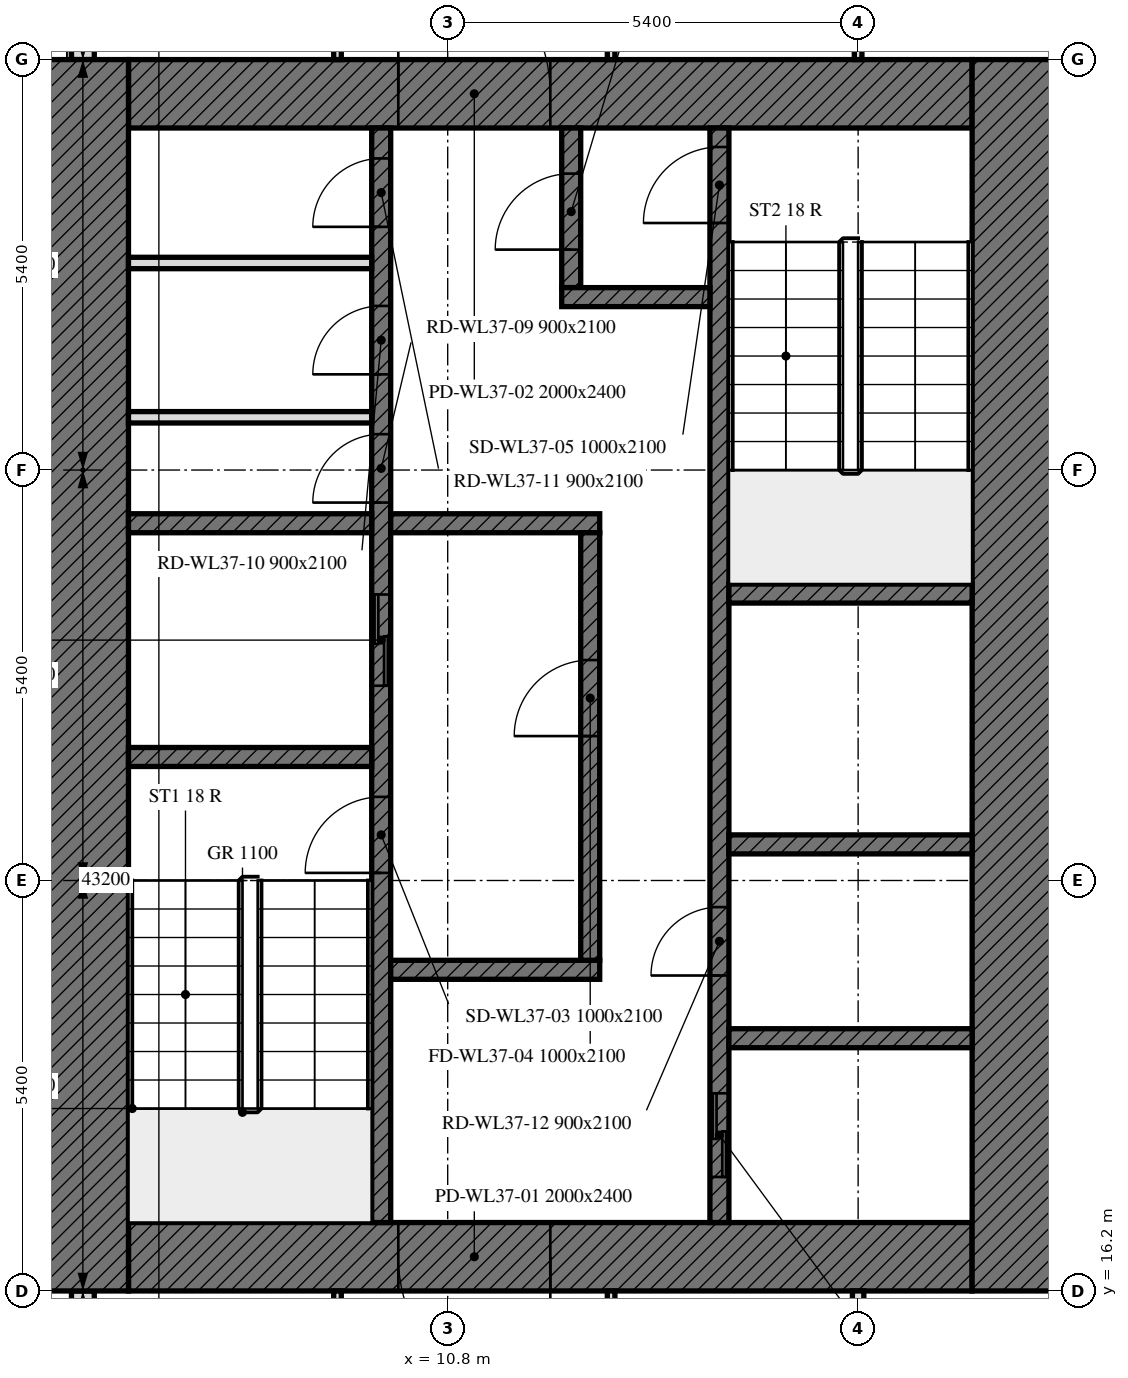
"""IFC4 building model, lengths in metres.
Left out: names, types, materials, properties, quantities, classifications, styles, units other than length and angle.
Written with IfcOpenShell. Run it as: python <this file> out.ifc"""

import sys

from ifc_helpers import new_model, si_unit, direction, frame, frame_2d, origin, place, context, subcontext, project, spatial, rectangle, extrude, element, fill, save


model = new_model("IFC4")
c1 = context("Model", 3, precision=1e-05, world=origin(), true_north=direction((0.0, 1.0)))
c2 = subcontext(c1, "Body", "Model", "MODEL_VIEW")
j1 = project(units=[si_unit("LENGTHUNIT", "METRE"), si_unit("PLANEANGLEUNIT", "RADIAN")], contexts=[c1])
p1 = place(None, origin())
s1 = spatial("IfcSite", under=j1, at=p1, CompositionType="ELEMENT")
p2 = place(p1, origin())
s2 = spatial("IfcBuilding", under=s1, at=p2, CompositionType="ELEMENT")
p3 = place(p2, frame((0.0, 0.0, 159.4)))
s3 = spatial("IfcBuildingStorey", under=s2, at=p3, CompositionType="ELEMENT", Elevation=159.4)
p4 = place(p3, frame((6.0, 37.614, 0.0), z_axis=(0.0, 0.0, 1.0), x_axis=(0.0, -1.0, 0.0)))
e1 = element("IfcWall", 1, at=p4, inside=s3, PredefinedType="SOLIDWALL", context=c2, shape_type="SweptSolid", body=[
    extrude(rectangle(XDim=5.214, YDim=0.3, at=frame_2d((2.607, 0.0))), origin(), (0.0, 0.0, 1.0), 3.0),
])
p5 = place(p4, frame((1.164, 0.0, 0.9)))
e2 = element("IfcOpeningElement", 2, at=p5, cuts=e1, PredefinedType="OPENING", context=c2, shape_type="SweptSolid", body=[
    extrude(rectangle(XDim=1.1, YDim=1.7, at=frame_2d((0.55, 0.85))), frame((0.0, 0.16, 0.0), z_axis=(0.0, -1.0, 0.0), x_axis=(1.0, 0.0, 0.0)), (0.0, 0.0, 1.0), 0.32),
])
p6 = place(p4, frame((2.764, 0.0, 0.9)))
e3 = element("IfcOpeningElement", 3, at=p6, cuts=e1, PredefinedType="OPENING", context=c2, shape_type="SweptSolid", body=[
    extrude(rectangle(XDim=1.1, YDim=1.7, at=frame_2d((0.55, 0.85))), frame((0.0, 0.16, 0.0), z_axis=(0.0, -1.0, 0.0), x_axis=(1.0, 0.0, 0.0)), (0.0, 0.0, 1.0), 0.32),
])
p7 = place(p3, frame((6.0, 16.2, 0.0), z_axis=(0.0, 0.0, 1.0), x_axis=(0.0, -1.0, 0.0)))
e4 = element("IfcWall", 4, at=p7, inside=s3, PredefinedType="SOLIDWALL", context=c2, shape_type="SweptSolid", body=[
    extrude(rectangle(XDim=10.614, YDim=0.3, at=frame_2d((5.307, 0.0))), origin(), (0.0, 0.0, 1.0), 3.0),
])
p8 = place(p7, frame((1.0, 0.0, 0.9)))
e5 = element("IfcOpeningElement", 5, at=p8, cuts=e4, PredefinedType="OPENING", context=c2, shape_type="SweptSolid", body=[
    extrude(rectangle(XDim=3.4, YDim=1.7, at=frame_2d((1.7, 0.85))), frame((0.0, 0.16, 0.0), z_axis=(0.0, -1.0, 0.0), x_axis=(1.0, 0.0, 0.0)), (0.0, 0.0, 1.0), 0.32),
])
p9 = place(p7, frame((7.375, 0.0, 0.9)))
e6 = element("IfcOpeningElement", 6, at=p9, cuts=e4, PredefinedType="OPENING", context=c2, shape_type="SweptSolid", body=[
    extrude(rectangle(XDim=0.65, YDim=1.7, at=frame_2d((0.325, 0.85))), frame((0.0, 0.16, 0.0), z_axis=(0.0, -1.0, 0.0), x_axis=(1.0, 0.0, 0.0)), (0.0, 0.0, 1.0), 0.32),
])
p10 = place(p7, frame((8.175, 0.0, 0.9)))
e7 = element("IfcOpeningElement", 7, at=p10, cuts=e4, PredefinedType="OPENING", context=c2, shape_type="SweptSolid", body=[
    extrude(rectangle(XDim=0.65, YDim=1.7, at=frame_2d((0.325, 0.85))), frame((0.0, 0.16, 0.0), z_axis=(0.0, -1.0, 0.0), x_axis=(1.0, 0.0, 0.0)), (0.0, 0.0, 1.0), 0.32),
])
p11 = place(p3, frame((17.7, 16.65, 0.0), z_axis=(0.0, 0.0, 1.0), x_axis=(-1.0, 0.0, 0.0)))
e8 = element("IfcWall", 8, at=p11, inside=s3, PredefinedType="SOLIDWALL", context=c2, shape_type="SweptSolid", body=[
    extrude(rectangle(XDim=11.1, YDim=0.9, at=frame_2d((5.55, 0.0))), origin(), (0.0, 0.0, 1.0), 3.0),
])
p12 = place(p11, frame((5.55, 0.0, 0.0)))
e9 = element("IfcOpeningElement", 9, at=p12, cuts=e8, PredefinedType="OPENING", context=c2, shape_type="SweptSolid", body=[
    extrude(rectangle(XDim=2.0, YDim=2.4, at=frame_2d((1.0, 1.2))), frame((0.0, 0.45, 0.0), z_axis=(0.0, -1.0, 0.0), x_axis=(1.0, 0.0, 0.0)), (0.0, 0.0, 1.0), 0.9),
])
p13 = place(p3, frame((6.6, 31.95, 0.0), z_axis=(0.0, 0.0, 1.0), x_axis=(1.0, 0.0, 0.0)))
e10 = element("IfcWall", 10, at=p13, inside=s3, PredefinedType="SOLIDWALL", context=c2, shape_type="SweptSolid", body=[
    extrude(rectangle(XDim=11.1, YDim=0.9, at=frame_2d((5.55, 0.0))), origin(), (0.0, 0.0, 1.0), 3.0),
])
p14 = place(p13, frame((3.55, 0.0, 0.0)))
e11 = element("IfcOpeningElement", 11, at=p14, cuts=e10, PredefinedType="OPENING", context=c2, shape_type="SweptSolid", body=[
    extrude(rectangle(XDim=2.0, YDim=2.4, at=frame_2d((1.0, 1.2))), frame((0.0, 0.45, 0.0), z_axis=(0.0, -1.0, 0.0), x_axis=(1.0, 0.0, 0.0)), (0.0, 0.0, 1.0), 0.9),
])
for number, where, z_axis, x_axis in (
    (12, (6.0, 16.2, 0.0), (0.0, 0.0, 1.0), (0.0, 1.0, 0.0)),
    (13, (18.3, 32.4, 0.0), (0.0, 0.0, 1.0), (0.0, -1.0, 0.0)),
):
    element("IfcWall", number, at=place(p3, frame(where, z_axis=z_axis, x_axis=x_axis)), inside=s3, PredefinedType="SOLIDWALL", context=c2, shape_type="SweptSolid", body=[
        extrude(rectangle(XDim=16.2, YDim=1.2, at=frame_2d((8.1, 0.0))), origin(), (0.0, 0.0, 1.0), 3.0),
    ])
p15 = place(p3, frame((9.925, 17.1, 0.0), z_axis=(0.0, 0.0, 1.0), x_axis=(0.0, 1.0, 0.0)))
e14 = element("IfcWall", 14, at=p15, inside=s3, PredefinedType="SOLIDWALL", context=c2, shape_type="SweptSolid", body=[
    extrude(rectangle(XDim=14.4, YDim=0.25, at=frame_2d((7.2, 0.0))), origin(), (0.0, 0.0, 1.0), 3.0),
])
p16 = place(p15, frame((4.6, 0.0, 0.0)))
e15 = element("IfcOpeningElement", 15, at=p16, cuts=e14, PredefinedType="OPENING", context=c2, shape_type="SweptSolid", body=[
    extrude(rectangle(XDim=1.0, YDim=2.1, at=frame_2d((0.5, 1.05))), frame((0.0, 0.125, 0.0), z_axis=(0.0, -1.0, 0.0), x_axis=(1.0, 0.0, 0.0)), (0.0, 0.0, 1.0), 0.25),
])
p17 = place(p15, frame((7.062, 0.0, 0.0)))
e16 = element("IfcOpeningElement", 16, at=p17, cuts=e14, PredefinedType="OPENING", context=c2, shape_type="SweptSolid", body=[
    extrude(rectangle(XDim=1.2, YDim=2.1, at=frame_2d((0.6, 1.05))), frame((0.0, 0.125, 0.0), z_axis=(0.0, -1.0, 0.0), x_axis=(1.0, 0.0, 0.0)), (0.0, 0.0, 1.0), 0.25),
])
p18 = place(p15, frame((9.472, 0.0, 0.0)))
e17 = element("IfcOpeningElement", 17, at=p18, cuts=e14, PredefinedType="OPENING", context=c2, shape_type="SweptSolid", body=[
    extrude(rectangle(XDim=0.9, YDim=2.1, at=frame_2d((0.45, 1.05))), frame((0.0, 0.125, 0.0), z_axis=(0.0, -1.0, 0.0), x_axis=(1.0, 0.0, 0.0)), (0.0, 0.0, 1.0), 0.25),
])
p19 = place(p15, frame((11.159, 0.0, 0.0)))
e18 = element("IfcOpeningElement", 18, at=p19, cuts=e14, PredefinedType="OPENING", context=c2, shape_type="SweptSolid", body=[
    extrude(rectangle(XDim=0.9, YDim=2.1, at=frame_2d((0.45, 1.05))), frame((0.0, 0.125, 0.0), z_axis=(0.0, -1.0, 0.0), x_axis=(1.0, 0.0, 0.0)), (0.0, 0.0, 1.0), 0.25),
])
p20 = place(p15, frame((13.1, 0.0, 0.0)))
e19 = element("IfcOpeningElement", 19, at=p20, cuts=e14, PredefinedType="OPENING", context=c2, shape_type="SweptSolid", body=[
    extrude(rectangle(XDim=0.9, YDim=2.1, at=frame_2d((0.45, 1.05))), frame((0.0, 0.125, 0.0), z_axis=(0.0, -1.0, 0.0), x_axis=(1.0, 0.0, 0.0)), (0.0, 0.0, 1.0), 0.25),
])
p21 = place(p3, frame((14.375, 17.1, 0.0), z_axis=(0.0, 0.0, 1.0), x_axis=(0.0, 1.0, 0.0)))
e20 = element("IfcWall", 20, at=p21, inside=s3, PredefinedType="SOLIDWALL", context=c2, shape_type="SweptSolid", body=[
    extrude(rectangle(XDim=14.4, YDim=0.25, at=frame_2d((7.2, 0.0))), origin(), (0.0, 0.0, 1.0), 3.0),
])
p22 = place(p21, frame((13.15, 0.0, 0.0)))
e21 = element("IfcOpeningElement", 21, at=p22, cuts=e20, PredefinedType="OPENING", context=c2, shape_type="SweptSolid", body=[
    extrude(rectangle(XDim=1.0, YDim=2.1, at=frame_2d((0.5, 1.05))), frame((0.0, 0.125, 0.0), z_axis=(0.0, -1.0, 0.0), x_axis=(1.0, 0.0, 0.0)), (0.0, 0.0, 1.0), 0.25),
])
p23 = place(p21, frame((0.6, 0.0, 0.0)))
e22 = element("IfcOpeningElement", 22, at=p23, cuts=e20, PredefinedType="OPENING", context=c2, shape_type="SweptSolid", body=[
    extrude(rectangle(XDim=1.1, YDim=2.1, at=frame_2d((0.55, 1.05))), frame((0.0, 0.125, 0.0), z_axis=(0.0, -1.0, 0.0), x_axis=(1.0, 0.0, 0.0)), (0.0, 0.0, 1.0), 0.25),
])
p24 = place(p21, frame((3.25, 0.0, 0.0)))
e23 = element("IfcOpeningElement", 23, at=p24, cuts=e20, PredefinedType="OPENING", context=c2, shape_type="SweptSolid", body=[
    extrude(rectangle(XDim=0.9, YDim=2.1, at=frame_2d((0.45, 1.05))), frame((0.0, 0.125, 0.0), z_axis=(0.0, -1.0, 0.0), x_axis=(1.0, 0.0, 0.0)), (0.0, 0.0, 1.0), 0.25),
])
for number, where, z_axis, x_axis in (
    (24, (6.6, 23.225, 0.0), (0.0, 0.0, 1.0), (1.0, 0.0, 0.0)),
    (25, (14.5, 25.375, 0.0), (0.0, 0.0, 1.0), (1.0, 0.0, 0.0)),
    (26, (14.5, 22.075, 0.0), (0.0, 0.0, 1.0), (1.0, 0.0, 0.0)),
    (27, (6.6, 26.3, 0.0), (0.0, 0.0, 1.0), (1.0, 0.0, 0.0)),
):
    element("IfcWall", number, at=place(p3, frame(where, z_axis=z_axis, x_axis=x_axis)), inside=s3, PredefinedType="SOLIDWALL", context=c2, shape_type="SweptSolid", body=[
        extrude(rectangle(XDim=3.2, YDim=0.25, at=frame_2d((1.6, 0.0))), origin(), (0.0, 0.0, 1.0), 3.0),
    ])
for number, where, z_axis, x_axis in (
    (28, (10.05, 26.3, 0.0), (0.0, 0.0, 1.0), (1.0, 0.0, 0.0)),
    (29, (10.05, 20.425, 0.0), (0.0, 0.0, 1.0), (1.0, 0.0, 0.0)),
):
    element("IfcWall", number, at=place(p3, frame(where, z_axis=z_axis, x_axis=x_axis)), inside=s3, PredefinedType="SOLIDWALL", context=c2, shape_type="SweptSolid", body=[
        extrude(rectangle(XDim=2.75, YDim=0.25, at=frame_2d((1.375, 0.0))), origin(), (0.0, 0.0, 1.0), 3.0),
    ])
p25 = place(p3, frame((12.425, 29.4, 0.0), z_axis=(0.0, 0.0, 1.0), x_axis=(0.0, 1.0, 0.0)))
e30 = element("IfcWall", 30, at=p25, inside=s3, PredefinedType="SOLIDWALL", context=c2, shape_type="SweptSolid", body=[
    extrude(rectangle(XDim=2.1, YDim=0.25, at=frame_2d((1.05, 0.0))), origin(), (0.0, 0.0, 1.0), 3.0),
])
p26 = place(p25, frame((0.5, 0.0, 0.0)))
e31 = element("IfcOpeningElement", 31, at=p26, cuts=e30, PredefinedType="OPENING", context=c2, shape_type="SweptSolid", body=[
    extrude(rectangle(XDim=1.0, YDim=2.1, at=frame_2d((0.5, 1.05))), frame((0.0, 0.125, 0.0), z_axis=(0.0, -1.0, 0.0), x_axis=(1.0, 0.0, 0.0)), (0.0, 0.0, 1.0), 0.25),
])
p27 = place(p3, frame((12.3, 29.275, 0.0), z_axis=(0.0, 0.0, 1.0), x_axis=(1.0, 0.0, 0.0)))
e32 = element("IfcWall", 32, at=p27, inside=s3, PredefinedType="SOLIDWALL", context=c2, shape_type="SweptSolid", body=[
    extrude(rectangle(XDim=1.95, YDim=0.25, at=frame_2d((0.975, 0.0))), origin(), (0.0, 0.0, 1.0), 3.0),
])
p28 = place(p3, frame((12.675, 20.55, 0.0), z_axis=(0.0, 0.0, 1.0), x_axis=(0.0, 1.0, 0.0)))
e33 = element("IfcWall", 33, at=p28, inside=s3, PredefinedType="SOLIDWALL", context=c2, shape_type="SweptSolid", body=[
    extrude(rectangle(XDim=5.625, YDim=0.25, at=frame_2d((2.812, 0.0))), origin(), (0.0, 0.0, 1.0), 3.0),
])
p29 = place(p28, frame((2.95, 0.0, 0.0)))
e34 = element("IfcOpeningElement", 34, at=p29, cuts=e33, PredefinedType="OPENING", context=c2, shape_type="SweptSolid", body=[
    extrude(rectangle(XDim=1.0, YDim=2.1, at=frame_2d((0.5, 1.05))), frame((0.0, 0.125, 0.0), z_axis=(0.0, -1.0, 0.0), x_axis=(1.0, 0.0, 0.0)), (0.0, 0.0, 1.0), 0.25),
])
p30 = place(p3, frame((14.5, 19.525, 0.0), z_axis=(0.0, 0.0, 1.0), x_axis=(1.0, 0.0, 0.0)))
e35 = element("IfcWall", 35, at=p30, inside=s3, PredefinedType="SOLIDWALL", context=c2, shape_type="SweptSolid", body=[
    extrude(rectangle(XDim=3.2, YDim=0.25, at=frame_2d((1.6, 0.0))), origin(), (0.0, 0.0, 1.0), 3.0),
])
for number, where, z_axis, x_axis in (
    (36, (6.6, 27.694, 0.0), (0.0, 0.0, 1.0), (1.0, 0.0, 0.0)),
    (37, (6.6, 29.724, 0.0), (0.0, 0.0, 1.0), (1.0, 0.0, 0.0)),
):
    element("IfcWall", number, at=place(p3, frame(where, z_axis=z_axis, x_axis=x_axis)), inside=s3, PredefinedType="PARTITIONING", context=c2, shape_type="SweptSolid", body=[
        extrude(rectangle(XDim=3.2, YDim=0.15, at=frame_2d((1.6, 0.0))), origin(), (0.0, 0.0, 1.0), 3.0),
    ])
for number, where, z_axis, x_axis in (
    (38, (16.2, 35.025, 0.0), (0.0, 0.0, 1.0), (0.0, -1.0, 0.0)),
    (39, (9.35, 35.025, 0.0), (0.0, 0.0, 1.0), (0.0, -1.0, 0.0)),
    (40, (12.95, 32.4, 0.0), (0.0, 0.0, 1.0), (0.0, 1.0, 0.0)),
):
    element("IfcWall", number, at=place(p3, frame(where, z_axis=z_axis, x_axis=x_axis)), inside=s3, PredefinedType="PARTITIONING", context=c2, shape_type="SweptSolid", body=[
        extrude(rectangle(XDim=2.625, YDim=0.1, at=frame_2d((1.312, 0.0))), origin(), (0.0, 0.0, 1.0), 3.0),
    ])
p31 = place(p3, frame((16.2, 16.2, 0.0), z_axis=(0.0, 0.0, 1.0), x_axis=(0.0, -1.0, 0.0)))
e41 = element("IfcWall", 41, at=p31, inside=s3, PredefinedType="PARTITIONING", context=c2, shape_type="SweptSolid", body=[
    extrude(rectangle(XDim=4.955, YDim=0.15, at=frame_2d((2.478, 0.0))), origin(), (0.0, 0.0, 1.0), 2.4),
])
for number, where, z_axis, x_axis in (
    (42, (9.35, 16.2, 0.0), (0.0, 0.0, 1.0), (0.0, -1.0, 0.0)),
    (43, (12.95, 9.075, 0.0), (0.0, 0.0, 1.0), (0.0, 1.0, 0.0)),
):
    element("IfcWall", number, at=place(p3, frame(where, z_axis=z_axis, x_axis=x_axis)), inside=s3, PredefinedType="PARTITIONING", context=c2, shape_type="SweptSolid", body=[
        extrude(rectangle(XDim=7.125, YDim=0.1, at=frame_2d((3.562, 0.0))), origin(), (0.0, 0.0, 1.0), 3.0),
    ])
p32 = place(p12, origin())
e44 = element("IfcDoor", 44, at=p32, inside=s3, OperationType="DOUBLE_DOOR_SINGLE_SWING", PredefinedType="DOOR", context=c2, shape_type="SweptSolid", body=[
    extrude(rectangle(XDim=2.0, YDim=2.4, at=frame_2d((1.0, 1.2))), frame((0.0, 0.025, 0.0), z_axis=(0.0, -1.0, 0.0), x_axis=(1.0, 0.0, 0.0)), (0.0, 0.0, 1.0), 0.05),
])
fill(e9, e44)
p33 = place(p14, origin())
e45 = element("IfcDoor", 45, at=p33, inside=s3, OperationType="DOUBLE_DOOR_SINGLE_SWING", PredefinedType="DOOR", context=c2, shape_type="SweptSolid", body=[
    extrude(rectangle(XDim=2.0, YDim=2.4, at=frame_2d((1.0, 1.2))), frame((0.0, 0.025, 0.0), z_axis=(0.0, -1.0, 0.0), x_axis=(1.0, 0.0, 0.0)), (0.0, 0.0, 1.0), 0.05),
])
fill(e11, e45)
p34 = place(p16, origin())
e46 = element("IfcDoor", 46, at=p34, inside=s3, OperationType="SINGLE_SWING_LEFT", PredefinedType="DOOR", context=c2, shape_type="SweptSolid", body=[
    extrude(rectangle(XDim=1.0, YDim=2.1, at=frame_2d((0.5, 1.05))), frame((0.0, 0.025, 0.0), z_axis=(0.0, -1.0, 0.0), x_axis=(1.0, 0.0, 0.0)), (0.0, 0.0, 1.0), 0.05),
])
fill(e15, e46)
p35 = place(p29, origin())
e47 = element("IfcDoor", 47, at=p35, inside=s3, OperationType="SINGLE_SWING_LEFT", PredefinedType="DOOR", context=c2, shape_type="SweptSolid", body=[
    extrude(rectangle(XDim=1.0, YDim=2.1, at=frame_2d((0.5, 1.05))), frame((0.0, 0.025, 0.0), z_axis=(0.0, -1.0, 0.0), x_axis=(1.0, 0.0, 0.0)), (0.0, 0.0, 1.0), 0.05),
])
fill(e34, e47)
p36 = place(p22, origin())
e48 = element("IfcDoor", 48, at=p36, inside=s3, OperationType="SINGLE_SWING_LEFT", PredefinedType="DOOR", context=c2, shape_type="SweptSolid", body=[
    extrude(rectangle(XDim=1.0, YDim=2.1, at=frame_2d((0.5, 1.05))), frame((0.0, 0.025, 0.0), z_axis=(0.0, -1.0, 0.0), x_axis=(1.0, 0.0, 0.0)), (0.0, 0.0, 1.0), 0.05),
])
fill(e21, e48)
p37 = place(p26, origin())
e49 = element("IfcDoor", 49, at=p37, inside=s3, OperationType="SINGLE_SWING_LEFT", PredefinedType="DOOR", context=c2, shape_type="SweptSolid", body=[
    extrude(rectangle(XDim=1.0, YDim=2.1, at=frame_2d((0.5, 1.05))), frame((0.0, 0.025, 0.0), z_axis=(0.0, -1.0, 0.0), x_axis=(1.0, 0.0, 0.0)), (0.0, 0.0, 1.0), 0.05),
])
fill(e31, e49)
p38 = place(p17, origin())
e50 = element("IfcDoor", 50, at=p38, inside=s3, OperationType="DOUBLE_DOOR_SLIDING", PredefinedType="DOOR", context=c2, shape_type="SweptSolid", body=[
    extrude(rectangle(XDim=1.2, YDim=2.1, at=frame_2d((0.6, 1.05))), frame((0.0, 0.025, 0.0), z_axis=(0.0, -1.0, 0.0), x_axis=(1.0, 0.0, 0.0)), (0.0, 0.0, 1.0), 0.05),
])
fill(e16, e50)
p39 = place(p23, origin())
e51 = element("IfcDoor", 51, at=p39, inside=s3, OperationType="DOUBLE_DOOR_SLIDING", PredefinedType="DOOR", context=c2, shape_type="SweptSolid", body=[
    extrude(rectangle(XDim=1.1, YDim=2.1, at=frame_2d((0.55, 1.05))), frame((0.0, 0.025, 0.0), z_axis=(0.0, -1.0, 0.0), x_axis=(1.0, 0.0, 0.0)), (0.0, 0.0, 1.0), 0.05),
])
fill(e22, e51)
p40 = place(p18, origin())
e52 = element("IfcDoor", 52, at=p40, inside=s3, OperationType="SINGLE_SWING_LEFT", PredefinedType="DOOR", context=c2, shape_type="SweptSolid", body=[
    extrude(rectangle(XDim=0.9, YDim=2.1, at=frame_2d((0.45, 1.05))), frame((0.0, 0.025, 0.0), z_axis=(0.0, -1.0, 0.0), x_axis=(1.0, 0.0, 0.0)), (0.0, 0.0, 1.0), 0.05),
])
fill(e17, e52)
p41 = place(p19, origin())
e53 = element("IfcDoor", 53, at=p41, inside=s3, OperationType="SINGLE_SWING_LEFT", PredefinedType="DOOR", context=c2, shape_type="SweptSolid", body=[
    extrude(rectangle(XDim=0.9, YDim=2.1, at=frame_2d((0.45, 1.05))), frame((0.0, 0.025, 0.0), z_axis=(0.0, -1.0, 0.0), x_axis=(1.0, 0.0, 0.0)), (0.0, 0.0, 1.0), 0.05),
])
fill(e18, e53)
p42 = place(p20, origin())
e54 = element("IfcDoor", 54, at=p42, inside=s3, OperationType="SINGLE_SWING_LEFT", PredefinedType="DOOR", context=c2, shape_type="SweptSolid", body=[
    extrude(rectangle(XDim=0.9, YDim=2.1, at=frame_2d((0.45, 1.05))), frame((0.0, 0.025, 0.0), z_axis=(0.0, -1.0, 0.0), x_axis=(1.0, 0.0, 0.0)), (0.0, 0.0, 1.0), 0.05),
])
fill(e19, e54)
p43 = place(p24, origin())
e55 = element("IfcDoor", 55, at=p43, inside=s3, OperationType="SINGLE_SWING_LEFT", PredefinedType="DOOR", context=c2, shape_type="SweptSolid", body=[
    extrude(rectangle(XDim=0.9, YDim=2.1, at=frame_2d((0.45, 1.05))), frame((0.0, 0.025, 0.0), z_axis=(0.0, -1.0, 0.0), x_axis=(1.0, 0.0, 0.0)), (0.0, 0.0, 1.0), 0.05),
])
fill(e23, e55)
save(model, sys.argv[1])
